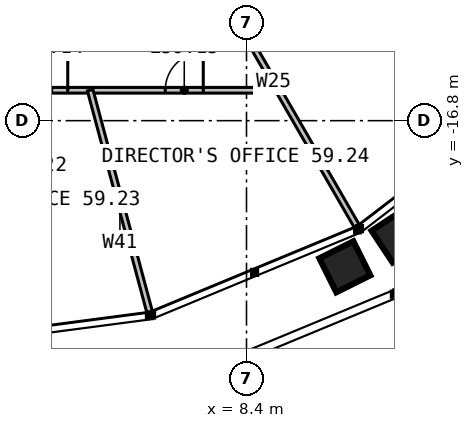
"""IFC4 building model, lengths in metres.
Left out: names, types, materials, properties, quantities, classifications, styles, units other than length and angle.
Written with IfcOpenShell. Run it as: python <this file> out.ifc"""

import sys

from ifc_helpers import new_model, si_unit, direction, frame, frame_2d, origin, place, context, subcontext, project, spatial, rectangle, extrude, element, fill, save


model = new_model("IFC4")
c1 = context("Model", 3, precision=1e-05, world=origin(), true_north=direction((0.0, 1.0)))
c2 = subcontext(c1, "Body", "Model", "MODEL_VIEW")
j1 = project(units=[si_unit("LENGTHUNIT", "METRE"), si_unit("PLANEANGLEUNIT", "RADIAN")], contexts=[c1])
p1 = place(None, origin())
s1 = spatial("IfcSite", under=j1, at=p1, CompositionType="ELEMENT")
p2 = place(p1, origin())
s2 = spatial("IfcBuilding", under=s1, at=p2, CompositionType="ELEMENT")
p3 = place(p2, frame((0.0, 0.0, 244.0)))
s3 = spatial("IfcBuildingStorey", under=s2, at=p3, CompositionType="ELEMENT", Elevation=244.0)
p4 = place(p3, frame((6.928, -12.0, 0.0), z_axis=(0.0, 0.0, 1.0), x_axis=(0.500008971228, -0.866020224182, 0.0)))
e1 = element("IfcWall", 1, at=p4, inside=s3, PredefinedType="PARTITIONING", context=c2, shape_type="SweptSolid", body=[
    extrude(rectangle(XDim=8.753, YDim=0.15, at=frame_2d((4.376, 0.0))), origin(), (0.0, 0.0, 1.0), 2.79),
])
p5 = place(p3, frame((12.0, -12.0, 0.0), z_axis=(0.0, 0.0, 1.0), x_axis=(0.707106781187, -0.707106781187, 0.0)))
e2 = element("IfcWall", 2, at=p5, inside=s3, PredefinedType="PARTITIONING", context=c2, shape_type="SweptSolid", body=[
    extrude(rectangle(XDim=5.639, YDim=0.15, at=frame_2d((2.819, 0.0))), origin(), (0.0, 0.0, 1.0), 2.79),
])
p6 = place(p3, frame((-9.238, -16.0, 0.0), z_axis=(0.0, 0.0, 1.0), x_axis=(1.0, 0.0, 0.0)))
e3 = element("IfcWall", 3, at=p6, inside=s3, PredefinedType="PARTITIONING", context=c2, shape_type="SweptSolid", body=[
    extrude(rectangle(XDim=18.475, YDim=0.15, at=frame_2d((9.238, 0.0))), origin(), (0.0, 0.0, 1.0), 2.79),
])
p7 = place(p6, frame((0.805, 0.0, 0.0)))
e4 = element("IfcOpeningElement", 4, at=p7, cuts=e3, PredefinedType="OPENING", context=c2, shape_type="SweptSolid", body=[
    extrude(rectangle(XDim=1.0, YDim=2.2, at=frame_2d((0.5, 1.1))), frame((0.0, 0.085, 0.0), z_axis=(0.0, -1.0, 0.0), x_axis=(1.0, 0.0, 0.0)), (0.0, 0.0, 1.0), 0.17),
])
p8 = place(p6, frame((4.371, 0.0, 0.0)))
e5 = element("IfcOpeningElement", 5, at=p8, cuts=e3, PredefinedType="OPENING", context=c2, shape_type="SweptSolid", body=[
    extrude(rectangle(XDim=1.0, YDim=2.2, at=frame_2d((0.5, 1.1))), frame((0.0, 0.085, 0.0), z_axis=(0.0, -1.0, 0.0), x_axis=(1.0, 0.0, 0.0)), (0.0, 0.0, 1.0), 0.17),
])
p9 = place(p6, frame((8.738, 0.0, 0.0)))
e6 = element("IfcOpeningElement", 6, at=p9, cuts=e3, PredefinedType="OPENING", context=c2, shape_type="SweptSolid", body=[
    extrude(rectangle(XDim=1.0, YDim=2.2, at=frame_2d((0.5, 1.1))), frame((0.0, 0.085, 0.0), z_axis=(0.0, -1.0, 0.0), x_axis=(1.0, 0.0, 0.0)), (0.0, 0.0, 1.0), 0.17),
])
p10 = place(p6, frame((11.934, 0.0, 0.0)))
e7 = element("IfcOpeningElement", 7, at=p10, cuts=e3, PredefinedType="OPENING", context=c2, shape_type="SweptSolid", body=[
    extrude(rectangle(XDim=1.0, YDim=2.2, at=frame_2d((0.5, 1.1))), frame((0.0, 0.085, 0.0), z_axis=(0.0, -1.0, 0.0), x_axis=(1.0, 0.0, 0.0)), (0.0, 0.0, 1.0), 0.17),
])
p11 = place(p6, frame((15.5, 0.0, 0.0)))
e8 = element("IfcOpeningElement", 8, at=p11, cuts=e3, PredefinedType="OPENING", context=c2, shape_type="SweptSolid", body=[
    extrude(rectangle(XDim=1.0, YDim=2.2, at=frame_2d((0.5, 1.1))), frame((0.0, 0.085, 0.0), z_axis=(0.0, -1.0, 0.0), x_axis=(1.0, 0.0, 0.0)), (0.0, 0.0, 1.0), 0.17),
])
p12 = place(p3, frame((4.287, -16.0, 0.0), z_axis=(0.0, 0.0, 1.0), x_axis=(0.258846444451, -0.965918484239, 0.0)))
e9 = element("IfcWall", 9, at=p12, inside=s3, PredefinedType="PARTITIONING", context=c2, shape_type="SweptSolid", body=[
    extrude(rectangle(XDim=6.045, YDim=0.15, at=frame_2d((3.022, 0.0))), origin(), (0.0, 0.0, 1.0), 2.79),
])
p13 = place(p10, origin())
e10 = element("IfcDoor", 10, at=p13, inside=s3, OperationType="SINGLE_SWING_RIGHT", PredefinedType="DOOR", context=c2, shape_type="SweptSolid", body=[
    extrude(rectangle(XDim=1.0, YDim=2.2, at=frame_2d((0.5, 1.1))), frame((0.0, 0.025, 0.0), z_axis=(0.0, -1.0, 0.0), x_axis=(1.0, 0.0, 0.0)), (0.0, 0.0, 1.0), 0.05),
])
fill(e7, e10)
p14 = place(p11, origin())
e11 = element("IfcDoor", 11, at=p14, inside=s3, OperationType="SINGLE_SWING_RIGHT", PredefinedType="DOOR", context=c2, shape_type="SweptSolid", body=[
    extrude(rectangle(XDim=1.0, YDim=2.2, at=frame_2d((0.5, 1.1))), frame((0.0, 0.025, 0.0), z_axis=(0.0, -1.0, 0.0), x_axis=(1.0, 0.0, 0.0)), (0.0, 0.0, 1.0), 0.05),
])
fill(e8, e11)
save(model, sys.argv[1])
